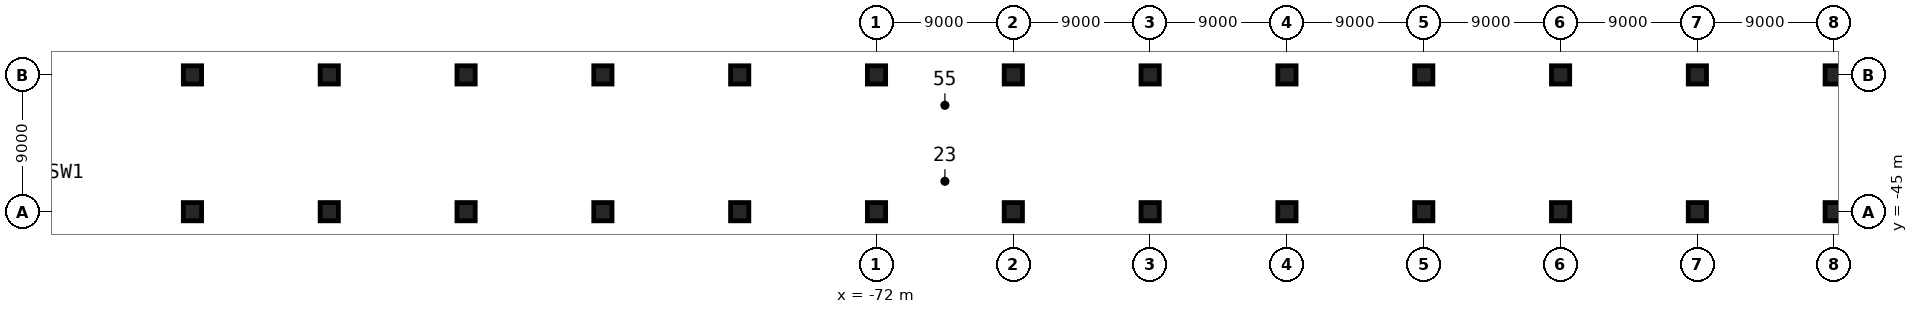
"""IFC4 building model, lengths in metres.
Left out: names, types, materials, properties, quantities, classifications, styles, units other than length and angle.
Written with IfcOpenShell. Run it as: python <this file> out.ifc"""

import sys

from ifc_helpers import new_model, si_unit, direction, frame, origin, origin_2d, place, context, subcontext, project, spatial, rectangle, extrude, element, save


model = new_model("IFC4")
c1 = context("Model", 3, precision=1e-05, world=origin(), true_north=direction((0.0, 1.0)))
c2 = subcontext(c1, "Body", "Model", "MODEL_VIEW")
j1 = project(units=[si_unit("LENGTHUNIT", "METRE"), si_unit("PLANEANGLEUNIT", "RADIAN")], contexts=[c1])
p1 = place(None, origin())
s1 = spatial("IfcSite", under=j1, at=p1, CompositionType="ELEMENT")
p2 = place(p1, origin())
s2 = spatial("IfcBuilding", under=s1, at=p2, CompositionType="ELEMENT")
p3 = place(p2, frame((0.0, 0.0, -9.0)))
s3 = spatial("IfcBuildingStorey", under=s2, at=p3, CompositionType="ELEMENT", Elevation=-9.0)
for number, where, z_axis, x_axis in (
    (1, (-117.0, -45.0, 0.0), (0.0, 0.0, 1.0), (1.0, 0.0, 0.0)),
    (2, (-117.0, -36.0, 0.0), (0.0, 0.0, 1.0), (1.0, 0.0, 0.0)),
    (3, (-108.0, -45.0, 0.0), (0.0, 0.0, 1.0), (1.0, 0.0, 0.0)),
    (4, (-108.0, -36.0, 0.0), (0.0, 0.0, 1.0), (1.0, 0.0, 0.0)),
    (5, (-99.0, -45.0, 0.0), (0.0, 0.0, 1.0), (1.0, 0.0, 0.0)),
    (6, (-99.0, -36.0, 0.0), (0.0, 0.0, 1.0), (1.0, 0.0, 0.0)),
    (7, (-90.0, -45.0, 0.0), (0.0, 0.0, 1.0), (1.0, 0.0, 0.0)),
    (8, (-90.0, -36.0, 0.0), (0.0, 0.0, 1.0), (1.0, 0.0, 0.0)),
    (9, (-81.0, -45.0, 0.0), (0.0, 0.0, 1.0), (1.0, 0.0, 0.0)),
    (10, (-81.0, -36.0, 0.0), (0.0, 0.0, 1.0), (1.0, 0.0, 0.0)),
    (11, (-72.0, -45.0, 0.0), (0.0, 0.0, 1.0), (1.0, 0.0, 0.0)),
    (12, (-72.0, -36.0, 0.0), (0.0, 0.0, 1.0), (1.0, 0.0, 0.0)),
    (13, (-63.0, -45.0, 0.0), (0.0, 0.0, 1.0), (1.0, 0.0, 0.0)),
    (14, (-63.0, -36.0, 0.0), (0.0, 0.0, 1.0), (1.0, 0.0, 0.0)),
    (15, (-54.0, -45.0, 0.0), (0.0, 0.0, 1.0), (1.0, 0.0, 0.0)),
    (16, (-54.0, -36.0, 0.0), (0.0, 0.0, 1.0), (1.0, 0.0, 0.0)),
    (17, (-45.0, -45.0, 0.0), (0.0, 0.0, 1.0), (1.0, 0.0, 0.0)),
    (18, (-45.0, -36.0, 0.0), (0.0, 0.0, 1.0), (1.0, 0.0, 0.0)),
    (19, (-36.0, -45.0, 0.0), (0.0, 0.0, 1.0), (1.0, 0.0, 0.0)),
    (20, (-36.0, -36.0, 0.0), (0.0, 0.0, 1.0), (1.0, 0.0, 0.0)),
    (21, (-27.0, -45.0, 0.0), (0.0, 0.0, 1.0), (1.0, 0.0, 0.0)),
    (22, (-27.0, -36.0, 0.0), (0.0, 0.0, 1.0), (1.0, 0.0, 0.0)),
    (23, (-18.0, -45.0, 0.0), (0.0, 0.0, 1.0), (1.0, 0.0, 0.0)),
    (24, (-18.0, -36.0, 0.0), (0.0, 0.0, 1.0), (1.0, 0.0, 0.0)),
    (25, (-9.0, -45.0, 0.0), (0.0, 0.0, 1.0), (1.0, 0.0, 0.0)),
    (26, (-9.0, -36.0, 0.0), (0.0, 0.0, 1.0), (1.0, 0.0, 0.0)),
):
    element("IfcColumn", number, at=place(p3, frame(where, z_axis=z_axis, x_axis=x_axis)), inside=s3, PredefinedType="COLUMN", context=c2, shape_type="SweptSolid", body=[
        extrude(rectangle(XDim=1.2, YDim=1.2, at=origin_2d()), origin(), (0.0, 0.0, 1.0), 4.5),
    ])
save(model, sys.argv[1])
